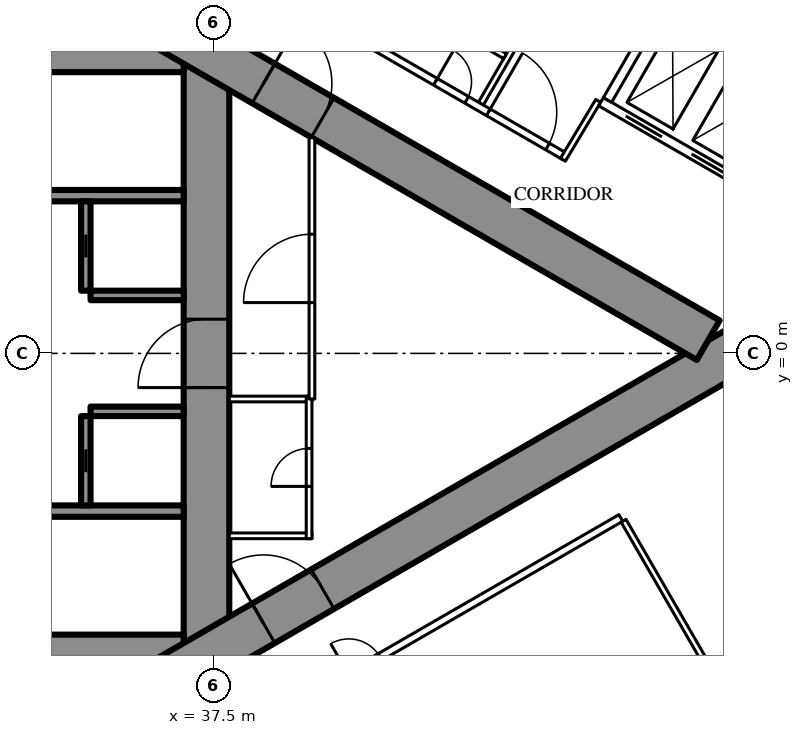
"""IFC4 building model, lengths in metres.
Left out: names, types, materials, properties, quantities, classifications, styles, units other than length and angle.
Written with IfcOpenShell. Run it as: python <this file> out.ifc"""

import sys

from ifc_helpers import new_model, si_unit, direction, frame, frame_2d, origin, place, context, subcontext, project, spatial, rectangle, extrude, element, fill, save


model = new_model("IFC4")
c1 = context("Model", 3, precision=1e-05, world=origin(), true_north=direction((0.0, 1.0)))
c2 = subcontext(c1, "Body", "Model", "MODEL_VIEW")
j1 = project(units=[si_unit("LENGTHUNIT", "METRE"), si_unit("PLANEANGLEUNIT", "RADIAN")], contexts=[c1])
p1 = place(None, origin())
s1 = spatial("IfcSite", under=j1, at=p1, CompositionType="ELEMENT")
p2 = place(p1, origin())
s2 = spatial("IfcBuilding", under=s1, at=p2, CompositionType="ELEMENT")
p3 = place(p2, frame((0.0, 0.0, 184.3)))
s3 = spatial("IfcBuildingStorey", under=s2, at=p3, CompositionType="ELEMENT", Elevation=184.3)
p4 = place(p3, frame((37.3, -8.6, 0.0), z_axis=(0.0, 0.0, 1.0), x_axis=(0.0, 1.0, 0.0)))
e1 = element("IfcWall", 1, at=p4, inside=s3, PredefinedType="SHEAR", context=c2, shape_type="SweptSolid", body=[
    extrude(rectangle(XDim=17.2, YDim=1.2, at=frame_2d((8.6, 0.0))), origin(), (0.0, 0.0, 1.0), 3.5),
])
p5 = place(p4, frame((7.7, 0.0, 0.0)))
e2 = element("IfcOpeningElement", 2, at=p5, cuts=e1, PredefinedType="OPENING", context=c2, shape_type="SweptSolid", body=[
    extrude(rectangle(XDim=1.8, YDim=2.2, at=frame_2d((0.9, 1.1))), frame((0.0, 0.61, 0.0), z_axis=(0.0, -1.0, 0.0), x_axis=(1.0, 0.0, 0.0)), (0.0, 0.0, 1.0), 1.22),
])
p6 = place(p3, frame((28.3, -8.0, 0.0), z_axis=(0.0, 0.0, 1.0), x_axis=(1.0, 0.0, 0.0)))
e3 = element("IfcWall", 3, at=p6, inside=s3, PredefinedType="SHEAR", context=c2, shape_type="SweptSolid", body=[
    extrude(rectangle(XDim=8.4, YDim=1.2, at=frame_2d((4.2, 0.0))), origin(), (0.0, 0.0, 1.0), 3.5),
])
p7 = place(p6, frame((0.25, 0.0, 0.0)))
e4 = element("IfcOpeningElement", 4, at=p7, cuts=e3, PredefinedType="OPENING", context=c2, shape_type="SweptSolid", body=[
    extrude(rectangle(XDim=1.0, YDim=2.2, at=frame_2d((0.5, 1.1))), frame((0.0, 0.61, 0.0), z_axis=(0.0, -1.0, 0.0), x_axis=(1.0, 0.0, 0.0)), (0.0, 0.0, 1.0), 1.22),
])
p8 = place(p3, frame((28.3, 8.0, 0.0), z_axis=(0.0, 0.0, 1.0), x_axis=(1.0, 0.0, 0.0)))
e5 = element("IfcWall", 5, at=p8, inside=s3, PredefinedType="SHEAR", context=c2, shape_type="SweptSolid", body=[
    extrude(rectangle(XDim=8.4, YDim=1.2, at=frame_2d((4.2, 0.0))), origin(), (0.0, 0.0, 1.0), 3.5),
])
p9 = place(p8, frame((0.25, 0.0, 0.0)))
e6 = element("IfcOpeningElement", 6, at=p9, cuts=e5, PredefinedType="OPENING", context=c2, shape_type="SweptSolid", body=[
    extrude(rectangle(XDim=1.0, YDim=2.2, at=frame_2d((0.5, 1.1))), frame((0.0, 0.61, 0.0), z_axis=(0.0, -1.0, 0.0), x_axis=(1.0, 0.0, 0.0)), (0.0, 0.0, 1.0), 1.22),
])
for number, where, z_axis, x_axis in (
    (7, (28.3, -4.15, 0.0), (0.0, 0.0, 1.0), (1.0, 0.0, 0.0)),
    (8, (28.3, 4.15, 0.0), (0.0, 0.0, 1.0), (1.0, 0.0, 0.0)),
):
    element("IfcWall", number, at=place(p3, frame(where, z_axis=z_axis, x_axis=x_axis)), inside=s3, PredefinedType="SHEAR", context=c2, shape_type="SweptSolid", body=[
        extrude(rectangle(XDim=8.4, YDim=0.3, at=frame_2d((4.2, 0.0))), origin(), (0.0, 0.0, 1.0), 3.5),
    ])
p10 = place(p3, frame((34.125, -4.0, 0.0), z_axis=(0.0, 0.0, 1.0), x_axis=(0.0, 1.0, 0.0)))
e9 = element("IfcWall", 9, at=p10, inside=s3, PredefinedType="SHEAR", context=c2, shape_type="SweptSolid", body=[
    extrude(rectangle(XDim=2.35, YDim=0.25, at=frame_2d((1.175, 0.0))), origin(), (0.0, 0.0, 1.0), 3.5),
])
p11 = place(p10, frame((0.875, 0.0, 0.0)))
e10 = element("IfcOpeningElement", 10, at=p11, cuts=e9, PredefinedType="OPENING", context=c2, shape_type="SweptSolid", body=[
    extrude(rectangle(XDim=0.6, YDim=2.0, at=frame_2d((0.3, 1.0))), frame((0.0, 0.135, 0.0), z_axis=(0.0, -1.0, 0.0), x_axis=(1.0, 0.0, 0.0)), (0.0, 0.0, 1.0), 0.27),
])
p12 = place(p3, frame((34.25, -1.525, 0.0), z_axis=(0.0, 0.0, 1.0), x_axis=(1.0, 0.0, 0.0)))
e11 = element("IfcWall", 11, at=p12, inside=s3, PredefinedType="SHEAR", context=c2, shape_type="SweptSolid", body=[
    extrude(rectangle(XDim=2.45, YDim=0.25, at=frame_2d((1.225, 0.0))), origin(), (0.0, 0.0, 1.0), 3.5),
])
p13 = place(p3, frame((34.125, 1.65, 0.0), z_axis=(0.0, 0.0, 1.0), x_axis=(0.0, 1.0, 0.0)))
e12 = element("IfcWall", 12, at=p13, inside=s3, PredefinedType="SHEAR", context=c2, shape_type="SweptSolid", body=[
    extrude(rectangle(XDim=2.35, YDim=0.25, at=frame_2d((1.175, 0.0))), origin(), (0.0, 0.0, 1.0), 3.5),
])
p14 = place(p13, frame((0.875, 0.0, 0.0)))
e13 = element("IfcOpeningElement", 13, at=p14, cuts=e12, PredefinedType="OPENING", context=c2, shape_type="SweptSolid", body=[
    extrude(rectangle(XDim=0.6, YDim=2.0, at=frame_2d((0.3, 1.0))), frame((0.0, 0.135, 0.0), z_axis=(0.0, -1.0, 0.0), x_axis=(1.0, 0.0, 0.0)), (0.0, 0.0, 1.0), 0.27),
])
p15 = place(p3, frame((34.25, 1.525, 0.0), z_axis=(0.0, 0.0, 1.0), x_axis=(1.0, 0.0, 0.0)))
e14 = element("IfcWall", 14, at=p15, inside=s3, PredefinedType="SHEAR", context=c2, shape_type="SweptSolid", body=[
    extrude(rectangle(XDim=2.45, YDim=0.25, at=frame_2d((1.225, 0.0))), origin(), (0.0, 0.0, 1.0), 3.5),
])
p16 = place(p3, frame((27.2, -13.8, 0.0), z_axis=(0.0, 0.0, 1.0), x_axis=(0.866027159892, 0.499996958321, 0.0)))
e15 = element("IfcWall", 15, at=p16, inside=s3, PredefinedType="SHEAR", context=c2, shape_type="SweptSolid", body=[
    extrude(rectangle(XDim=27.947, YDim=1.2, at=frame_2d((13.973, 0.0))), origin(), (0.0, 0.0, 1.0), 3.5),
])
p17 = place(p16, frame((4.6, 0.0, 0.0)))
e16 = element("IfcOpeningElement", 16, at=p17, cuts=e15, PredefinedType="OPENING", context=c2, shape_type="SweptSolid", body=[
    extrude(rectangle(XDim=1.0, YDim=2.2, at=frame_2d((0.5, 1.1))), frame((0.0, 0.61, 0.0), z_axis=(0.0, -1.0, 0.0), x_axis=(1.0, 0.0, 0.0)), (0.0, 0.0, 1.0), 1.22),
])
p18 = place(p16, frame((13.395, 0.0, 0.0)))
e17 = element("IfcOpeningElement", 17, at=p18, cuts=e15, PredefinedType="OPENING", context=c2, shape_type="SweptSolid", body=[
    extrude(rectangle(XDim=1.8, YDim=2.2, at=frame_2d((0.9, 1.1))), frame((0.0, 0.61, 0.0), z_axis=(0.0, -1.0, 0.0), x_axis=(1.0, 0.0, 0.0)), (0.0, 0.0, 1.0), 1.22),
])
p19 = place(p3, frame((27.2, 13.8, 0.0), z_axis=(0.0, 0.0, 1.0), x_axis=(0.866024515034, -0.500001539357, 0.0)))
e18 = element("IfcWall", 18, at=p19, inside=s3, PredefinedType="SHEAR", context=c2, shape_type="SweptSolid", body=[
    extrude(rectangle(XDim=26.907, YDim=1.2, at=frame_2d((13.454, 0.0))), origin(), (0.0, 0.0, 1.0), 3.5),
])
p20 = place(p19, frame((4.6, 0.0, 0.0)))
e19 = element("IfcOpeningElement", 19, at=p20, cuts=e18, PredefinedType="OPENING", context=c2, shape_type="SweptSolid", body=[
    extrude(rectangle(XDim=1.0, YDim=2.2, at=frame_2d((0.5, 1.1))), frame((0.0, 0.61, 0.0), z_axis=(0.0, -1.0, 0.0), x_axis=(1.0, 0.0, 0.0)), (0.0, 0.0, 1.0), 1.22),
])
p21 = place(p19, frame((13.395, 0.0, 0.0)))
e20 = element("IfcOpeningElement", 20, at=p21, cuts=e18, PredefinedType="OPENING", context=c2, shape_type="SweptSolid", body=[
    extrude(rectangle(XDim=1.8, YDim=2.2, at=frame_2d((0.9, 1.1))), frame((0.0, 0.61, 0.0), z_axis=(0.0, -1.0, 0.0), x_axis=(1.0, 0.0, 0.0)), (0.0, 0.0, 1.0), 1.22),
])
p22 = place(p3, frame((48.275, -4.404, 0.0), z_axis=(0.0, 0.0, 1.0), x_axis=(0.500006004368, -0.866021937133, 0.0)))
e21 = element("IfcWall", 21, at=p22, inside=s3, PredefinedType="PARTITIONING", context=c2, shape_type="SweptSolid", body=[
    extrude(rectangle(XDim=7.279, YDim=0.15, at=frame_2d((3.64, 0.0))), origin(), (0.0, 0.0, 1.0), 2.3),
])
p23 = place(p3, frame((44.521, 6.571, 0.0), z_axis=(0.0, 0.0, 1.0), x_axis=(0.500020376429, 0.866013639128, 0.0)))
e22 = element("IfcWall", 22, at=p23, inside=s3, PredefinedType="PARTITIONING", context=c2, shape_type="SweptSolid", body=[
    extrude(rectangle(XDim=7.306, YDim=0.15, at=frame_2d((3.653, 0.0))), origin(), (0.0, 0.0, 1.0), 2.3),
])
p24 = place(p3, frame((27.959, 16.017, 0.0), z_axis=(0.0, 0.0, 1.0), x_axis=(0.866027146794, -0.499996981007, 0.0)))
e23 = element("IfcWall", 23, at=p24, inside=s3, PredefinedType="PARTITIONING", context=c2, shape_type="SweptSolid", body=[
    extrude(rectangle(XDim=21.657, YDim=0.2, at=frame_2d((10.829, 0.0))), origin(), (0.0, 0.0, 1.0), 3.25),
])
p25 = place(p24, frame((17.741, 0.0, 0.0)))
e24 = element("IfcOpeningElement", 24, at=p25, cuts=e23, PredefinedType="OPENING", context=c2, shape_type="SweptSolid", body=[
    extrude(rectangle(XDim=0.95, YDim=2.2, at=frame_2d((0.475, 1.1))), frame((0.0, 0.11, 0.0), z_axis=(0.0, -1.0, 0.0), x_axis=(1.0, 0.0, 0.0)), (0.0, 0.0, 1.0), 0.22),
])
p26 = place(p24, frame((10.782, 0.0, 0.0)))
e25 = element("IfcOpeningElement", 25, at=p26, cuts=e23, PredefinedType="OPENING", context=c2, shape_type="SweptSolid", body=[
    extrude(rectangle(XDim=0.95, YDim=2.2, at=frame_2d((0.475, 1.1))), frame((0.0, 0.11, 0.0), z_axis=(0.0, -1.0, 0.0), x_axis=(1.0, 0.0, 0.0)), (0.0, 0.0, 1.0), 0.22),
])
p27 = place(p24, frame((6.732, 0.0, 0.0)))
e26 = element("IfcOpeningElement", 26, at=p27, cuts=e23, PredefinedType="OPENING", context=c2, shape_type="SweptSolid", body=[
    extrude(rectangle(XDim=0.95, YDim=2.2, at=frame_2d((0.475, 1.1))), frame((0.0, 0.11, 0.0), z_axis=(0.0, -1.0, 0.0), x_axis=(1.0, 0.0, 0.0)), (0.0, 0.0, 1.0), 0.22),
])
p28 = place(p24, frame((19.349, 0.0, 0.0)))
e27 = element("IfcOpeningElement", 27, at=p28, cuts=e23, PredefinedType="OPENING", context=c2, shape_type="SweptSolid", body=[
    extrude(rectangle(XDim=1.8, YDim=2.2, at=frame_2d((0.9, 1.1))), frame((0.0, 0.11, 0.0), z_axis=(0.0, -1.0, 0.0), x_axis=(1.0, 0.0, 0.0)), (0.0, 0.0, 1.0), 0.22),
])
p29 = place(p3, frame((47.606, 6.643, 0.0), z_axis=(0.0, 0.0, 1.0), x_axis=(-0.514237157483, -0.857648031458, 0.0)))
e28 = element("IfcWall", 28, at=p29, inside=s3, PredefinedType="PARTITIONING", context=c2, shape_type="SweptSolid", body=[
    extrude(rectangle(XDim=1.805, YDim=0.15, at=frame_2d((0.902, 0.0))), origin(), (0.0, 0.0, 1.0), 3.25),
])
p30 = place(p3, frame((27.959, -16.017, 0.0), z_axis=(0.0, 0.0, 1.0), x_axis=(0.866024180982, 0.50000211795, 0.0)))
e29 = element("IfcWall", 29, at=p30, inside=s3, PredefinedType="PARTITIONING", context=c2, shape_type="SweptSolid", body=[
    extrude(rectangle(XDim=23.375, YDim=0.2, at=frame_2d((11.688, 0.0))), origin(), (0.0, 0.0, 1.0), 3.25),
])
p31 = place(p30, frame((2.415, 0.0, 0.0)))
e30 = element("IfcOpeningElement", 30, at=p31, cuts=e29, PredefinedType="OPENING", context=c2, shape_type="SweptSolid", body=[
    extrude(rectangle(XDim=0.95, YDim=2.2, at=frame_2d((0.475, 1.1))), frame((0.0, 0.11, 0.0), z_axis=(0.0, -1.0, 0.0), x_axis=(1.0, 0.0, 0.0)), (0.0, 0.0, 1.0), 0.22),
])
p32 = place(p30, frame((9.215, 0.0, 0.0)))
e31 = element("IfcOpeningElement", 31, at=p32, cuts=e29, PredefinedType="OPENING", context=c2, shape_type="SweptSolid", body=[
    extrude(rectangle(XDim=1.0, YDim=2.2, at=frame_2d((0.5, 1.1))), frame((0.0, 0.11, 0.0), z_axis=(0.0, -1.0, 0.0), x_axis=(1.0, 0.0, 0.0)), (0.0, 0.0, 1.0), 0.22),
])
p33 = place(p30, frame((15.109, 0.0, 0.0)))
e32 = element("IfcOpeningElement", 32, at=p33, cuts=e29, PredefinedType="OPENING", context=c2, shape_type="SweptSolid", body=[
    extrude(rectangle(XDim=0.95, YDim=2.2, at=frame_2d((0.475, 1.1))), frame((0.0, 0.11, 0.0), z_axis=(0.0, -1.0, 0.0), x_axis=(1.0, 0.0, 0.0)), (0.0, 0.0, 1.0), 0.22),
])
p34 = place(p3, frame((43.013, 9.058, 0.0), z_axis=(0.0, 0.0, 1.0), x_axis=(0.866006523861, -0.500032699561, 0.0)))
e33 = element("IfcWall", 33, at=p34, inside=s3, PredefinedType="PARTITIONING", context=c2, shape_type="SweptSolid", body=[
    extrude(rectangle(XDim=2.475, YDim=0.15, at=frame_2d((1.237, 0.0))), origin(), (0.0, 0.0, 1.0), 2.45),
])
for number, where, z_axis, x_axis in (
    (34, (37.9, -1.2, 0.0), (0.0, 0.0, 1.0), (1.0, 0.0, 0.0)),
    (35, (37.9, -4.8, 0.0), (0.0, 0.0, 1.0), (1.0, 0.0, 0.0)),
):
    element("IfcWall", number, at=place(p3, frame(where, z_axis=z_axis, x_axis=x_axis)), inside=s3, PredefinedType="PARTITIONING", context=c2, shape_type="SweptSolid", body=[
        extrude(rectangle(XDim=2.175, YDim=0.15, at=frame_2d((1.087, 0.0))), origin(), (0.0, 0.0, 1.0), 3.25),
    ])
p35 = place(p3, frame((40.0, -4.875, 0.0), z_axis=(0.0, 0.0, 1.0), x_axis=(0.0, 1.0, 0.0)))
e36 = element("IfcWall", 36, at=p35, inside=s3, PredefinedType="PARTITIONING", context=c2, shape_type="SweptSolid", body=[
    extrude(rectangle(XDim=3.75, YDim=0.15, at=frame_2d((1.875, 0.0))), origin(), (0.0, 0.0, 1.0), 3.25),
])
p36 = place(p35, frame((1.375, 0.0, 0.0)))
e37 = element("IfcOpeningElement", 37, at=p36, cuts=e36, PredefinedType="OPENING", context=c2, shape_type="SweptSolid", body=[
    extrude(rectangle(XDim=1.0, YDim=2.2, at=frame_2d((0.5, 1.1))), frame((0.0, 0.085, 0.0), z_axis=(0.0, -1.0, 0.0), x_axis=(1.0, 0.0, 0.0)), (0.0, 0.0, 1.0), 0.17),
])
p37 = place(p3, frame((40.075, -1.2, 0.0), z_axis=(0.0, 0.0, 1.0), x_axis=(0.0, 1.0, 0.0)))
e38 = element("IfcWall", 38, at=p37, inside=s3, PredefinedType="PARTITIONING", context=c2, shape_type="SweptSolid", body=[
    extrude(rectangle(XDim=6.874, YDim=0.15, at=frame_2d((3.437, 0.0))), origin(), (0.0, 0.0, 1.0), 3.25),
])
p38 = place(p37, frame((2.537, 0.0, 0.0)))
e39 = element("IfcOpeningElement", 39, at=p38, cuts=e38, PredefinedType="OPENING", context=c2, shape_type="SweptSolid", body=[
    extrude(rectangle(XDim=1.8, YDim=2.2, at=frame_2d((0.9, 1.1))), frame((0.0, 0.085, 0.0), z_axis=(0.0, -1.0, 0.0), x_axis=(1.0, 0.0, 0.0)), (0.0, 0.0, 1.0), 0.17),
])
p39 = place(p3, frame((47.681, 6.622, 0.0), z_axis=(0.0, 0.0, 1.0), x_axis=(0.86603344179, -0.499986077507, 0.0)))
e40 = element("IfcWall", 40, at=p39, inside=s3, PredefinedType="PARTITIONING", context=c2, shape_type="SweptSolid", body=[
    extrude(rectangle(XDim=6.6, YDim=0.25, at=frame_2d((3.3, 0.0))), origin(), (0.0, 0.0, 1.0), 3.25),
])
p40 = place(p39, frame((0.75, 0.0, 0.0)))
e41 = element("IfcOpeningElement", 41, at=p40, cuts=e40, PredefinedType="OPENING", context=c2, shape_type="SweptSolid", body=[
    extrude(rectangle(XDim=1.1, YDim=2.2, at=frame_2d((0.55, 1.1))), frame((0.0, 0.135, 0.0), z_axis=(0.0, -1.0, 0.0), x_axis=(1.0, 0.0, 0.0)), (0.0, 0.0, 1.0), 0.27),
])
p41 = place(p39, frame((2.75, 0.0, 0.0)))
e42 = element("IfcOpeningElement", 42, at=p41, cuts=e40, PredefinedType="OPENING", context=c2, shape_type="SweptSolid", body=[
    extrude(rectangle(XDim=1.1, YDim=2.2, at=frame_2d((0.55, 1.1))), frame((0.0, 0.135, 0.0), z_axis=(0.0, -1.0, 0.0), x_axis=(1.0, 0.0, 0.0)), (0.0, 0.0, 1.0), 0.27),
])
p42 = place(p39, frame((4.75, 0.0, 0.0)))
e43 = element("IfcOpeningElement", 43, at=p42, cuts=e40, PredefinedType="OPENING", context=c2, shape_type="SweptSolid", body=[
    extrude(rectangle(XDim=1.1, YDim=2.2, at=frame_2d((0.55, 1.1))), frame((0.0, 0.135, 0.0), z_axis=(0.0, -1.0, 0.0), x_axis=(1.0, 0.0, 0.0)), (0.0, 0.0, 1.0), 0.27),
])
p43 = place(p3, frame((49.406, 9.611, 0.0), z_axis=(0.0, 0.0, 1.0), x_axis=(0.86603344179, -0.499986077507, 0.0)))
e44 = element("IfcWall", 44, at=p43, inside=s3, PredefinedType="PARTITIONING", context=c2, shape_type="SweptSolid", body=[
    extrude(rectangle(XDim=6.6, YDim=0.25, at=frame_2d((3.3, 0.0))), origin(), (0.0, 0.0, 1.0), 3.25),
])
p44 = place(p3, frame((47.852, 6.668, 0.0), z_axis=(0.0, 0.0, 1.0), x_axis=(0.499929347863, 0.866066190972, 0.0)))
e45 = element("IfcWall", 45, at=p44, inside=s3, PredefinedType="PARTITIONING", context=c2, shape_type="SweptSolid", body=[
    extrude(rectangle(XDim=3.201, YDim=0.25, at=frame_2d((1.6, 0.0))), origin(), (0.0, 0.0, 1.0), 3.25),
])
p45 = place(p25, origin())
e46 = element("IfcDoor", 46, at=p45, inside=s3, OperationType="SINGLE_SWING_LEFT", PredefinedType="DOOR", context=c2, shape_type="SweptSolid", body=[
    extrude(rectangle(XDim=0.95, YDim=2.2, at=frame_2d((0.475, 1.1))), frame((0.0, 0.025, 0.0), z_axis=(0.0, -1.0, 0.0), x_axis=(1.0, 0.0, 0.0)), (0.0, 0.0, 1.0), 0.05),
])
fill(e24, e46)
p46 = place(p28, origin())
e47 = element("IfcDoor", 47, at=p46, inside=s3, OperationType="DOUBLE_DOOR_SINGLE_SWING", PredefinedType="DOOR", context=c2, shape_type="SweptSolid", body=[
    extrude(rectangle(XDim=1.8, YDim=2.2, at=frame_2d((0.9, 1.1))), frame((0.0, 0.025, 0.0), z_axis=(0.0, -1.0, 0.0), x_axis=(1.0, 0.0, 0.0)), (0.0, 0.0, 1.0), 0.05),
])
fill(e27, e47)
p47 = place(p36, origin())
e48 = element("IfcDoor", 48, at=p47, inside=s3, OperationType="SINGLE_SWING_LEFT", PredefinedType="DOOR", context=c2, shape_type="SweptSolid", body=[
    extrude(rectangle(XDim=1.0, YDim=2.2, at=frame_2d((0.5, 1.1))), frame((0.0, 0.025, 0.0), z_axis=(0.0, -1.0, 0.0), x_axis=(1.0, 0.0, 0.0)), (0.0, 0.0, 1.0), 0.05),
])
fill(e37, e48)
p48 = place(p38, origin())
e49 = element("IfcDoor", 49, at=p48, inside=s3, OperationType="DOUBLE_DOOR_SINGLE_SWING", PredefinedType="DOOR", context=c2, shape_type="SweptSolid", body=[
    extrude(rectangle(XDim=1.8, YDim=2.2, at=frame_2d((0.9, 1.1))), frame((0.0, 0.025, 0.0), z_axis=(0.0, -1.0, 0.0), x_axis=(1.0, 0.0, 0.0)), (0.0, 0.0, 1.0), 0.05),
])
fill(e39, e49)
p49 = place(p18, origin())
e50 = element("IfcDoor", 50, at=p49, inside=s3, OperationType="DOUBLE_DOOR_SINGLE_SWING", PredefinedType="DOOR", context=c2, shape_type="SweptSolid", body=[
    extrude(rectangle(XDim=1.8, YDim=2.2, at=frame_2d((0.9, 1.1))), frame((0.0, 0.025, 0.0), z_axis=(0.0, -1.0, 0.0), x_axis=(1.0, 0.0, 0.0)), (0.0, 0.0, 1.0), 0.05),
])
fill(e17, e50)
p50 = place(p21, origin())
e51 = element("IfcDoor", 51, at=p50, inside=s3, OperationType="DOUBLE_DOOR_SINGLE_SWING", PredefinedType="DOOR", context=c2, shape_type="SweptSolid", body=[
    extrude(rectangle(XDim=1.8, YDim=2.2, at=frame_2d((0.9, 1.1))), frame((0.0, 0.025, 0.0), z_axis=(0.0, -1.0, 0.0), x_axis=(1.0, 0.0, 0.0)), (0.0, 0.0, 1.0), 0.05),
])
fill(e20, e51)
p51 = place(p5, origin())
e52 = element("IfcDoor", 52, at=p51, inside=s3, OperationType="DOUBLE_DOOR_SINGLE_SWING", PredefinedType="DOOR", context=c2, shape_type="SweptSolid", body=[
    extrude(rectangle(XDim=1.8, YDim=2.2, at=frame_2d((0.9, 1.1))), frame((0.0, 0.025, 0.0), z_axis=(0.0, -1.0, 0.0), x_axis=(1.0, 0.0, 0.0)), (0.0, 0.0, 1.0), 0.05),
])
fill(e2, e52)
p52 = place(p11, origin())
e53 = element("IfcDoor", 53, at=p52, inside=s3, OperationType="SLIDING_TO_LEFT", PredefinedType="DOOR", context=c2, shape_type="SweptSolid", body=[
    extrude(rectangle(XDim=0.6, YDim=2.0, at=frame_2d((0.3, 1.0))), frame((0.0, 0.025, 0.0), z_axis=(0.0, -1.0, 0.0), x_axis=(1.0, 0.0, 0.0)), (0.0, 0.0, 1.0), 0.05),
])
fill(e10, e53)
p53 = place(p14, origin())
e54 = element("IfcDoor", 54, at=p53, inside=s3, OperationType="SLIDING_TO_LEFT", PredefinedType="DOOR", context=c2, shape_type="SweptSolid", body=[
    extrude(rectangle(XDim=0.6, YDim=2.0, at=frame_2d((0.3, 1.0))), frame((0.0, 0.025, 0.0), z_axis=(0.0, -1.0, 0.0), x_axis=(1.0, 0.0, 0.0)), (0.0, 0.0, 1.0), 0.05),
])
fill(e13, e54)
p54 = place(p40, origin())
e55 = element("IfcDoor", 55, at=p54, inside=s3, OperationType="DOUBLE_DOOR_SLIDING", PredefinedType="USERDEFINED", context=c2, shape_type="SweptSolid", body=[
    extrude(rectangle(XDim=1.1, YDim=2.2, at=frame_2d((0.55, 1.1))), frame((0.0, 0.025, 0.0), z_axis=(0.0, -1.0, 0.0), x_axis=(1.0, 0.0, 0.0)), (0.0, 0.0, 1.0), 0.05),
])
fill(e41, e55)
p55 = place(p41, origin())
e56 = element("IfcDoor", 56, at=p55, inside=s3, OperationType="DOUBLE_DOOR_SLIDING", PredefinedType="USERDEFINED", context=c2, shape_type="SweptSolid", body=[
    extrude(rectangle(XDim=1.1, YDim=2.2, at=frame_2d((0.55, 1.1))), frame((0.0, 0.025, 0.0), z_axis=(0.0, -1.0, 0.0), x_axis=(1.0, 0.0, 0.0)), (0.0, 0.0, 1.0), 0.05),
])
fill(e42, e56)
save(model, sys.argv[1])
